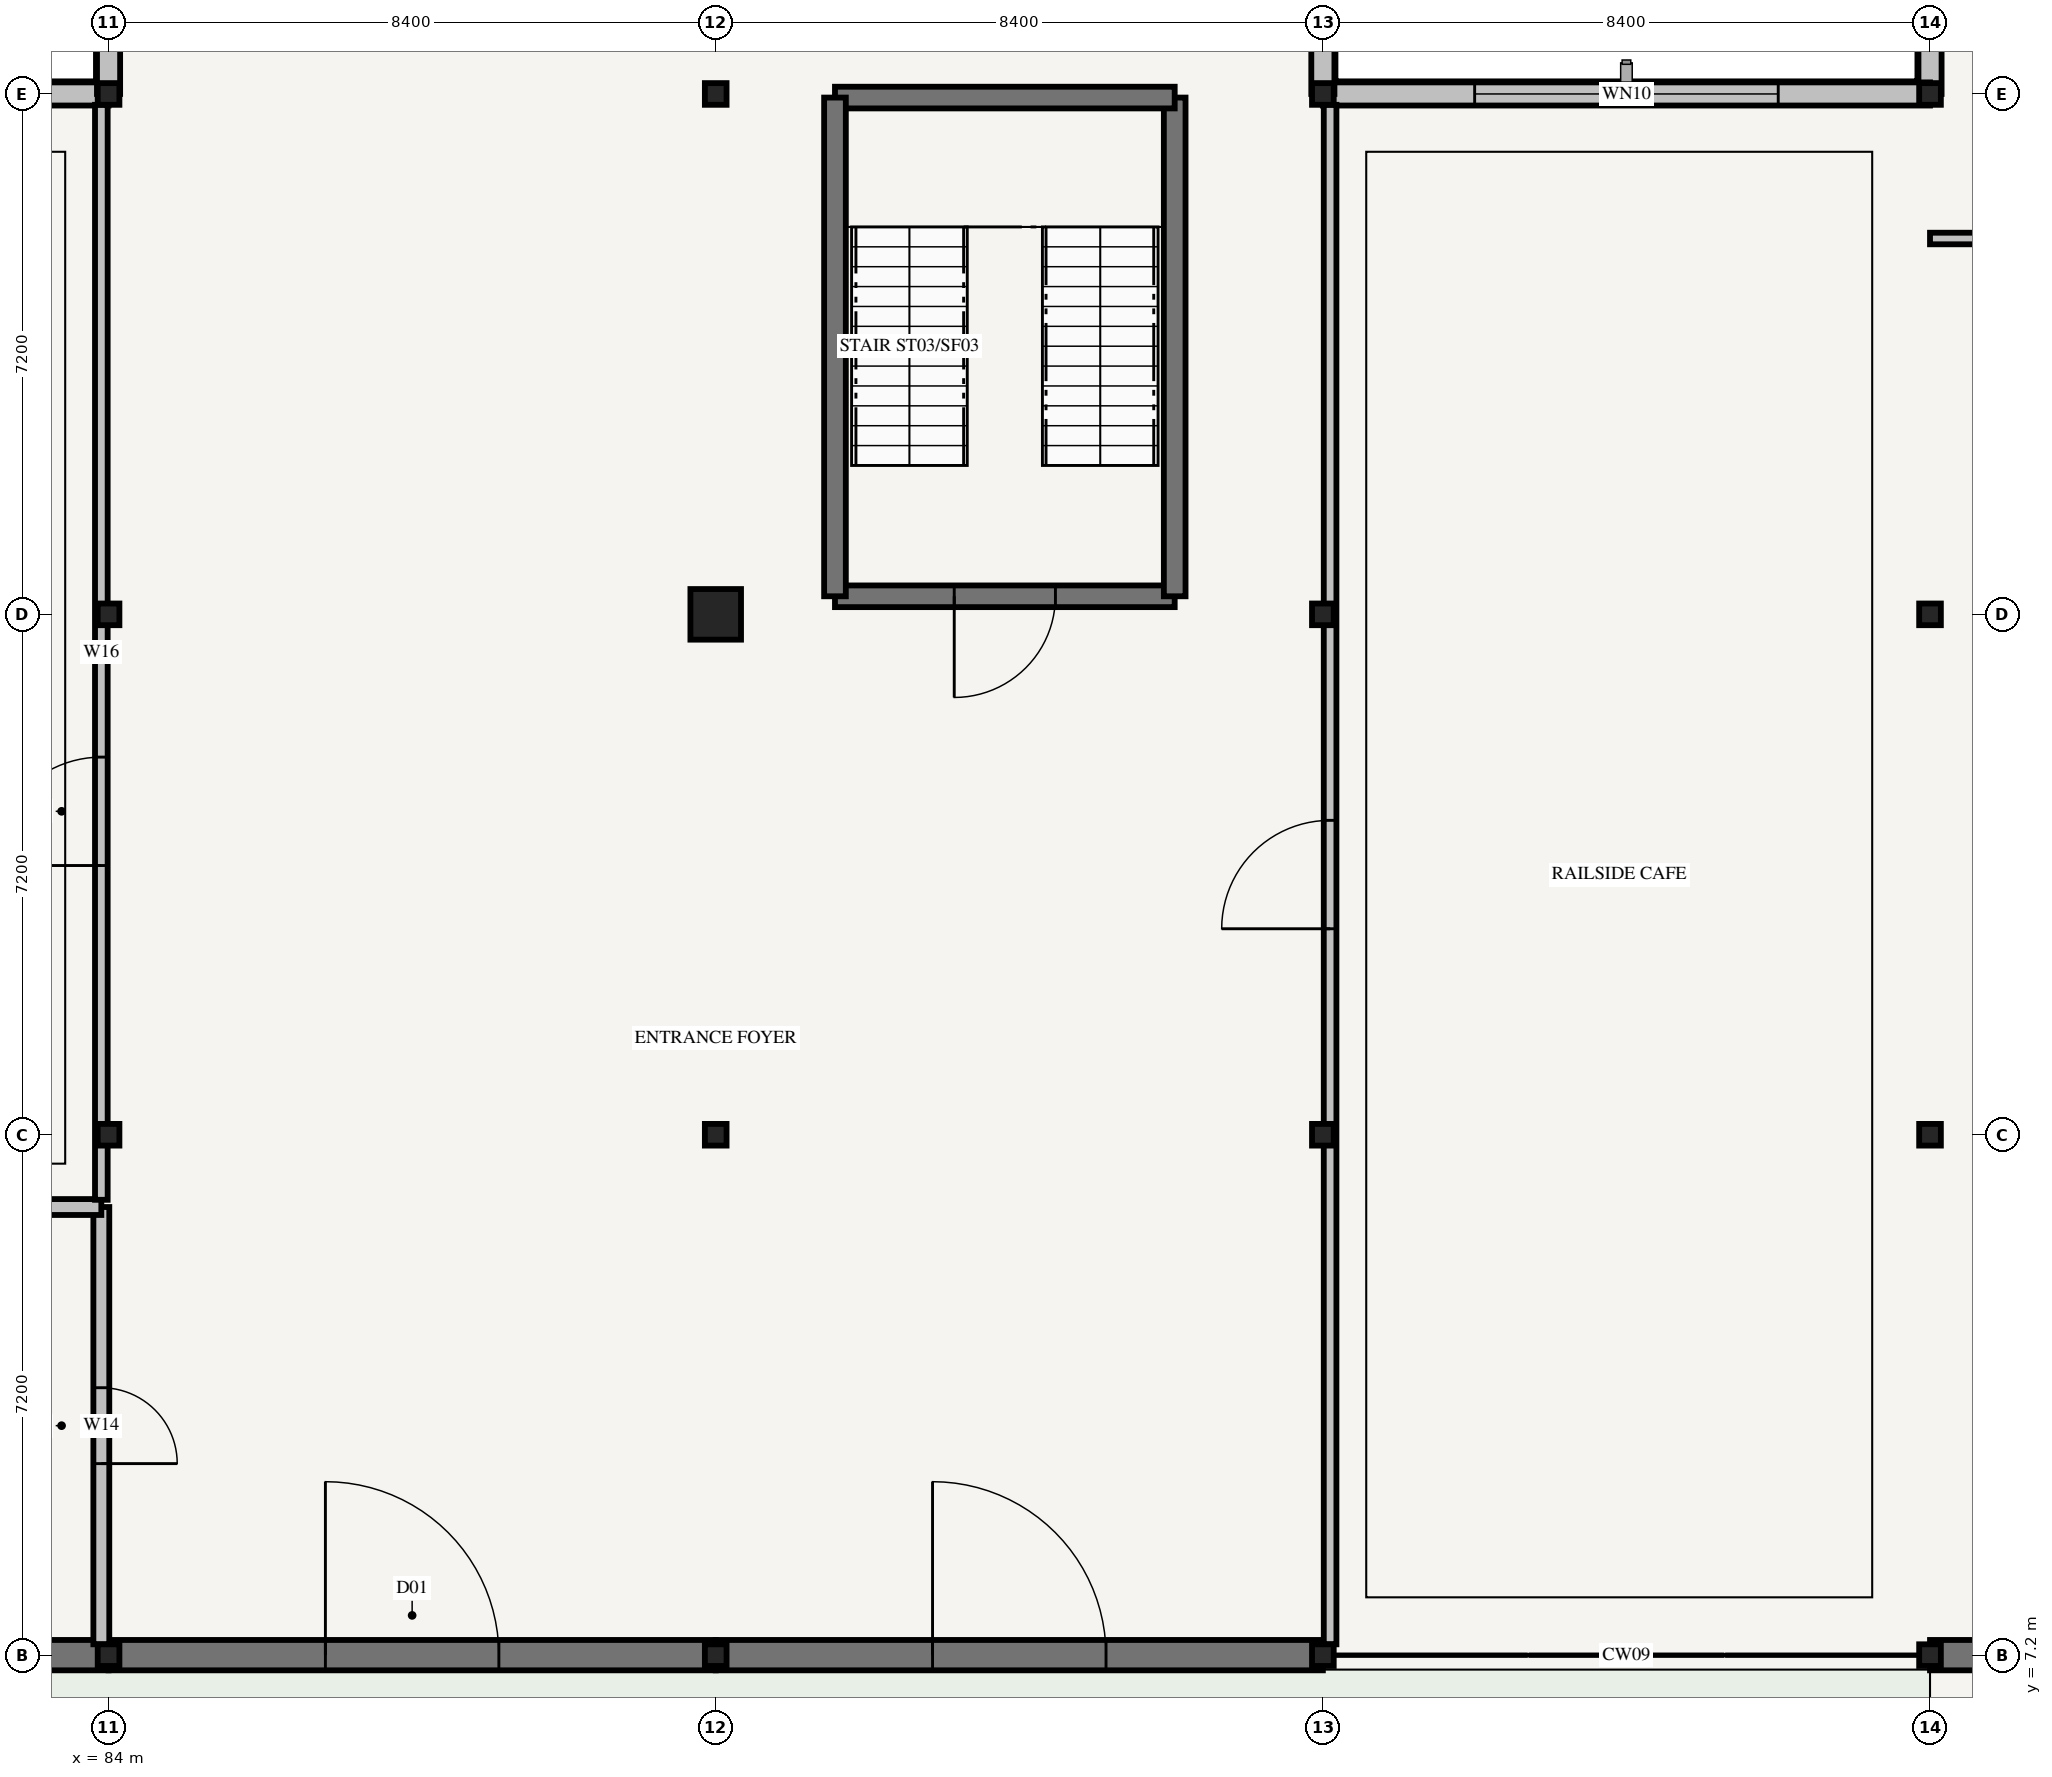
"""IFC4 building model, lengths in metres.
Left out: names, types, materials, properties, quantities, classifications, styles, units other than length and angle.
Written with IfcOpenShell. Run it as: python <this file> out.ifc"""

import sys

from ifc_helpers import new_model, si_unit, direction, frame, frame_2d, origin, origin_2d, place, context, subcontext, project, spatial, rectangle, i_section, extrude, element, fill, save


model = new_model("IFC4")
c1 = context("Model", 3, precision=1e-05, world=origin(), true_north=direction((0.0, 1.0)))
c2 = subcontext(c1, "Body", "Model", "MODEL_VIEW")
j1 = project(units=[si_unit("LENGTHUNIT", "METRE"), si_unit("PLANEANGLEUNIT", "RADIAN")], contexts=[c1])
p1 = place(None, origin())
s1 = spatial("IfcSite", under=j1, at=p1, CompositionType="ELEMENT")
p2 = place(p1, origin())
s2 = spatial("IfcBuilding", under=s1, at=p2, CompositionType="ELEMENT")
p3 = place(p2, origin())
s3 = spatial("IfcBuildingStorey", under=s2, at=p3, CompositionType="ELEMENT", Elevation=0.0)
for number, where, z_axis, x_axis in (
    (1, (84.0, 7.2, -0.42), (0.0, 0.0, 1.0), (1.0, 0.0, 0.0)),
    (2, (84.0, 14.4, -0.42), (0.0, 0.0, 1.0), (1.0, 0.0, 0.0)),
    (3, (84.0, 21.6, -0.42), (0.0, 0.0, 1.0), (1.0, 0.0, 0.0)),
    (4, (84.0, 28.8, -0.42), (0.0, 0.0, 1.0), (1.0, 0.0, 0.0)),
    (5, (92.4, 7.2, -0.42), (0.0, 0.0, 1.0), (1.0, 0.0, 0.0)),
    (6, (92.4, 14.4, -0.42), (0.0, 0.0, 1.0), (1.0, 0.0, 0.0)),
):
    element("IfcColumn", number, at=place(p3, frame(where, z_axis=z_axis, x_axis=x_axis)), inside=s3, PredefinedType="COLUMN", context=c2, shape_type="SweptSolid", body=[
        extrude(i_section(OverallWidth=0.3, OverallDepth=0.3, WebThickness=0.011, FlangeThickness=0.019, FilletRadius=0.027, at=origin_2d()), origin(), (0.0, 0.0, 1.0), 4.92),
    ])
p4 = place(p3, frame((92.4, 21.6, -0.42), z_axis=(0.0, 0.0, 1.0), x_axis=(1.0, 0.0, 0.0)))
e7 = element("IfcColumn", 7, at=p4, inside=s3, PredefinedType="COLUMN", context=c2, shape_type="SweptSolid", body=[
    extrude(rectangle(XDim=0.7, YDim=0.7, at=origin_2d()), origin(), (0.0, 0.0, 1.0), 4.92),
])
for number, where, z_axis, x_axis in (
    (8, (92.4, 28.8, -0.42), (0.0, 0.0, 1.0), (1.0, 0.0, 0.0)),
    (9, (100.8, 7.2, -0.42), (0.0, 0.0, 1.0), (1.0, 0.0, 0.0)),
    (10, (100.8, 14.4, -0.42), (0.0, 0.0, 1.0), (1.0, 0.0, 0.0)),
    (11, (100.8, 21.6, -0.42), (0.0, 0.0, 1.0), (1.0, 0.0, 0.0)),
    (12, (100.8, 28.8, -0.42), (0.0, 0.0, 1.0), (1.0, 0.0, 0.0)),
    (13, (109.2, 7.2, -0.42), (0.0, 0.0, 1.0), (1.0, 0.0, 0.0)),
    (14, (109.2, 14.4, -0.42), (0.0, 0.0, 1.0), (1.0, 0.0, 0.0)),
    (15, (109.2, 21.6, -0.42), (0.0, 0.0, 1.0), (1.0, 0.0, 0.0)),
    (16, (109.2, 28.8, -0.42), (0.0, 0.0, 1.0), (1.0, 0.0, 0.0)),
):
    element("IfcColumn", number, at=place(p3, frame(where, z_axis=z_axis, x_axis=x_axis)), inside=s3, PredefinedType="COLUMN", context=c2, shape_type="SweptSolid", body=[
        extrude(i_section(OverallWidth=0.3, OverallDepth=0.3, WebThickness=0.011, FlangeThickness=0.019, FilletRadius=0.027, at=origin_2d()), origin(), (0.0, 0.0, 1.0), 4.92),
    ])
p5 = place(p3, frame((84.0, 28.8, 0.0), z_axis=(0.0, 0.0, 1.0), x_axis=(-1.0, 0.0, 0.0)))
e17 = element("IfcWall", 17, at=p5, inside=s3, PredefinedType="STANDARD", context=c2, shape_type="SweptSolid", body=[
    extrude(rectangle(XDim=4.047, YDim=0.32, at=frame_2d((2.023, 0.0))), origin(), (0.0, 0.0, 1.0), 3.705),
])
p6 = place(p3, frame((75.6, 7.2, 0.0), z_axis=(0.0, 0.0, 1.0), x_axis=(1.0, 0.0, 0.0)))
e18 = element("IfcWall", 18, at=p6, inside=s3, PredefinedType="SOLIDWALL", context=c2, shape_type="SweptSolid", body=[
    extrude(rectangle(XDim=8.4, YDim=0.42, at=frame_2d((4.2, 0.0))), origin(), (0.0, 0.0, 1.0), 3.805),
])
p7 = place(p6, frame((3.6, 0.0, 0.0)))
e19 = element("IfcOpeningElement", 19, at=p7, cuts=e18, PredefinedType="OPENING", context=c2, shape_type="SweptSolid", body=[
    extrude(rectangle(XDim=1.2, YDim=2.25, at=frame_2d((0.6, 1.125))), frame((0.0, 0.235, 0.0), z_axis=(0.0, -1.0, 0.0), x_axis=(1.0, 0.0, 0.0)), (0.0, 0.0, 1.0), 0.47),
])
p8 = place(p3, frame((84.0, 7.2, 0.0), z_axis=(0.0, 0.0, 1.0), x_axis=(1.0, 0.0, 0.0)))
e20 = element("IfcWall", 20, at=p8, inside=s3, PredefinedType="SOLIDWALL", context=c2, shape_type="SweptSolid", body=[
    extrude(rectangle(XDim=8.4, YDim=0.42, at=frame_2d((4.2, 0.0))), origin(), (0.0, 0.0, 1.0), 3.855),
])
p9 = place(p8, frame((3.0, 0.0, 0.0)))
e21 = element("IfcOpeningElement", 21, at=p9, cuts=e20, PredefinedType="OPENING", context=c2, shape_type="SweptSolid", body=[
    extrude(rectangle(XDim=2.4, YDim=2.7, at=frame_2d((1.2, 1.35))), frame((0.0, 0.235, 0.0), z_axis=(0.0, -1.0, 0.0), x_axis=(1.0, 0.0, 0.0)), (0.0, 0.0, 1.0), 0.47),
])
p10 = place(p3, frame((92.4, 7.2, 0.0), z_axis=(0.0, 0.0, 1.0), x_axis=(1.0, 0.0, 0.0)))
e22 = element("IfcWall", 22, at=p10, inside=s3, PredefinedType="SOLIDWALL", context=c2, shape_type="SweptSolid", body=[
    extrude(rectangle(XDim=8.4, YDim=0.42, at=frame_2d((4.2, 0.0))), origin(), (0.0, 0.0, 1.0), 3.805),
])
p11 = place(p10, frame((3.0, 0.0, 0.0)))
e23 = element("IfcOpeningElement", 23, at=p11, cuts=e22, PredefinedType="OPENING", context=c2, shape_type="SweptSolid", body=[
    extrude(rectangle(XDim=2.4, YDim=2.7, at=frame_2d((1.2, 1.35))), frame((0.0, 0.235, 0.0), z_axis=(0.0, -1.0, 0.0), x_axis=(1.0, 0.0, 0.0)), (0.0, 0.0, 1.0), 0.47),
])
p12 = place(p3, frame((109.2, 7.2, 0.0), z_axis=(0.0, 0.0, 1.0), x_axis=(1.0, 0.0, 0.0)))
e24 = element("IfcWall", 24, at=p12, inside=s3, PredefinedType="SOLIDWALL", context=c2, shape_type="SweptSolid", body=[
    extrude(rectangle(XDim=8.4, YDim=0.42, at=frame_2d((4.2, 0.0))), origin(), (0.0, 0.0, 1.0), 3.855),
])
p13 = place(p3, frame((109.2, 36.0, 0.0), z_axis=(0.0, 0.0, 1.0), x_axis=(0.0, -1.0, 0.0)))
e25 = element("IfcWall", 25, at=p13, inside=s3, PredefinedType="STANDARD", context=c2, shape_type="SweptSolid", body=[
    extrude(rectangle(XDim=7.2, YDim=0.32, at=frame_2d((3.6, 0.0))), origin(), (0.0, 0.0, 1.0), 3.705),
])
p14 = place(p13, frame((2.0, 0.0, 2.1)))
e26 = element("IfcOpeningElement", 26, at=p14, cuts=e25, PredefinedType="OPENING", context=c2, shape_type="SweptSolid", body=[
    extrude(rectangle(XDim=3.2, YDim=1.2, at=frame_2d((1.6, 0.6))), frame((0.0, 0.185, 0.0), z_axis=(0.0, -1.0, 0.0), x_axis=(1.0, 0.0, 0.0)), (0.0, 0.0, 1.0), 0.37),
])
p15 = place(p3, frame((109.2, 28.8, 0.0), z_axis=(0.0, 0.0, 1.0), x_axis=(-1.0, 0.0, 0.0)))
e27 = element("IfcWall", 27, at=p15, inside=s3, PredefinedType="STANDARD", context=c2, shape_type="SweptSolid", body=[
    extrude(rectangle(XDim=8.4, YDim=0.32, at=frame_2d((4.2, 0.0))), origin(), (0.0, 0.0, 1.0), 3.705),
])
p16 = place(p15, frame((2.1, 0.0, 0.85)))
e28 = element("IfcOpeningElement", 28, at=p16, cuts=e27, PredefinedType="OPENING", context=c2, shape_type="SweptSolid", body=[
    extrude(rectangle(XDim=4.2, YDim=2.1, at=frame_2d((2.1, 1.05))), frame((0.0, 0.185, 0.0), z_axis=(0.0, -1.0, 0.0), x_axis=(1.0, 0.0, 0.0)), (0.0, 0.0, 1.0), 0.37),
])
p17 = place(p3, frame((100.8, 28.8, 0.0), z_axis=(0.0, 0.0, 1.0), x_axis=(0.0, 1.0, 0.0)))
e29 = element("IfcWall", 29, at=p17, inside=s3, PredefinedType="STANDARD", context=c2, shape_type="SweptSolid", body=[
    extrude(rectangle(XDim=7.2, YDim=0.32, at=frame_2d((3.6, 0.0))), origin(), (0.0, 0.0, 1.0), 3.705),
])
p18 = place(p17, frame((2.65, 0.0, 0.85)))
e30 = element("IfcOpeningElement", 30, at=p18, cuts=e29, PredefinedType="OPENING", context=c2, shape_type="SweptSolid", body=[
    extrude(rectangle(XDim=1.9, YDim=1.35, at=frame_2d((0.95, 0.675))), frame((0.0, 0.185, 0.0), z_axis=(0.0, -1.0, 0.0), x_axis=(1.0, 0.0, 0.0)), (0.0, 0.0, 1.0), 0.37),
])
p19 = place(p3, frame((84.0, 31.525, 0.0), z_axis=(0.0, 0.0, 1.0), x_axis=(0.0, -1.0, 0.0)))
e31 = element("IfcWall", 31, at=p19, inside=s3, PredefinedType="STANDARD", context=c2, shape_type="SweptSolid", body=[
    extrude(rectangle(XDim=2.725, YDim=0.32, at=frame_2d((1.362, 0.0))), origin(), (0.0, 0.0, 1.0), 3.705),
])
p20 = place(p3, frame((94.05, 21.85, 0.0), z_axis=(0.0, 0.0, 1.0), x_axis=(1.0, 0.0, 0.0)))
e32 = element("IfcWall", 32, at=p20, inside=s3, PredefinedType="SHEAR", context=c2, shape_type="SweptSolid", body=[
    extrude(rectangle(XDim=4.7, YDim=0.3, at=frame_2d((2.35, 0.0))), origin(), (0.0, 0.0, 1.0), 4.32),
])
p21 = place(p20, frame((1.65, 0.0, 0.0)))
e33 = element("IfcOpeningElement", 33, at=p21, cuts=e32, PredefinedType="OPENING", context=c2, shape_type="SweptSolid", body=[
    extrude(rectangle(XDim=1.4, YDim=2.2, at=frame_2d((0.7, 1.1))), frame((0.0, 0.175, 0.0), z_axis=(0.0, -1.0, 0.0), x_axis=(1.0, 0.0, 0.0)), (0.0, 0.0, 1.0), 0.35),
])
p22 = place(p3, frame((98.75, 21.85, 0.0), z_axis=(0.0, 0.0, 1.0), x_axis=(0.0, 1.0, 0.0)))
e34 = element("IfcWall", 34, at=p22, inside=s3, PredefinedType="SHEAR", context=c2, shape_type="SweptSolid", body=[
    extrude(rectangle(XDim=6.9, YDim=0.3, at=frame_2d((3.45, 0.0))), origin(), (0.0, 0.0, 1.0), 4.32),
])
p23 = place(p3, frame((98.75, 28.75, 0.0), z_axis=(0.0, 0.0, 1.0), x_axis=(-1.0, 0.0, 0.0)))
e35 = element("IfcWall", 35, at=p23, inside=s3, PredefinedType="SHEAR", context=c2, shape_type="SweptSolid", body=[
    extrude(rectangle(XDim=4.7, YDim=0.3, at=frame_2d((2.35, 0.0))), origin(), (0.0, 0.0, 1.0), 4.32),
])
p24 = place(p3, frame((94.05, 28.75, 0.0), z_axis=(0.0, 0.0, 1.0), x_axis=(0.0, -1.0, 0.0)))
e36 = element("IfcWall", 36, at=p24, inside=s3, PredefinedType="SHEAR", context=c2, shape_type="SweptSolid", body=[
    extrude(rectangle(XDim=6.9, YDim=0.3, at=frame_2d((3.45, 0.0))), origin(), (0.0, 0.0, 1.0), 4.32),
])
p25 = place(p3, frame((83.9, 7.35, 0.0), z_axis=(0.0, 0.0, 1.0), x_axis=(0.0, 1.0, 0.0)))
e37 = element("IfcWall", 37, at=p25, inside=s3, PredefinedType="PARTITIONING", context=c2, shape_type="SweptSolid", body=[
    extrude(rectangle(XDim=6.05, YDim=0.22, at=frame_2d((3.025, 0.0))), origin(), (0.0, 0.0, 1.0), 3.62),
])
p26 = place(p25, frame((2.5, 0.0, 0.0)))
e38 = element("IfcOpeningElement", 38, at=p26, cuts=e37, PredefinedType="OPENING", context=c2, shape_type="SweptSolid", body=[
    extrude(rectangle(XDim=1.05, YDim=2.15, at=frame_2d((0.525, 1.075))), frame((0.0, 0.135, 0.0), z_axis=(0.0, -1.0, 0.0), x_axis=(1.0, 0.0, 0.0)), (0.0, 0.0, 1.0), 0.27),
])
p27 = place(p3, frame((75.75, 13.4, 0.0), z_axis=(0.0, 0.0, 1.0), x_axis=(1.0, 0.0, 0.0)))
e39 = element("IfcWall", 39, at=p27, inside=s3, PredefinedType="PARTITIONING", context=c2, shape_type="SweptSolid", body=[
    extrude(rectangle(XDim=8.15, YDim=0.22, at=frame_2d((4.075, 0.0))), origin(), (0.0, 0.0, 1.0), 3.62),
])
p28 = place(p3, frame((83.9, 13.5, 0.0), z_axis=(0.0, 0.0, 1.0), x_axis=(0.0, 1.0, 0.0)))
e40 = element("IfcWall", 40, at=p28, inside=s3, PredefinedType="PARTITIONING", context=c2, shape_type="SweptSolid", body=[
    extrude(rectangle(XDim=15.15, YDim=0.175, at=frame_2d((7.575, 0.0))), origin(), (0.0, 0.0, 1.0), 3.62),
])
p29 = place(p28, frame((4.625, 0.0, 0.0)))
e41 = element("IfcOpeningElement", 41, at=p29, cuts=e40, PredefinedType="OPENING", context=c2, shape_type="SweptSolid", body=[
    extrude(rectangle(XDim=1.5, YDim=2.2, at=frame_2d((0.75, 1.1))), frame((0.0, 0.112, 0.0), z_axis=(0.0, -1.0, 0.0), x_axis=(1.0, 0.0, 0.0)), (0.0, 0.0, 1.0), 0.225),
])
p30 = place(p3, frame((100.9, 7.35, 0.0), z_axis=(0.0, 0.0, 1.0), x_axis=(0.0, 1.0, 0.0)))
e42 = element("IfcWall", 42, at=p30, inside=s3, PredefinedType="PARTITIONING", context=c2, shape_type="SweptSolid", body=[
    extrude(rectangle(XDim=21.3, YDim=0.175, at=frame_2d((10.65, 0.0))), origin(), (0.0, 0.0, 1.0), 3.62),
])
p31 = place(p30, frame((9.9, 0.0, 0.0)))
e43 = element("IfcOpeningElement", 43, at=p31, cuts=e42, PredefinedType="OPENING", context=c2, shape_type="SweptSolid", body=[
    extrude(rectangle(XDim=1.5, YDim=2.2, at=frame_2d((0.75, 1.1))), frame((0.0, 0.112, 0.0), z_axis=(0.0, -1.0, 0.0), x_axis=(1.0, 0.0, 0.0)), (0.0, 0.0, 1.0), 0.225),
])
p32 = place(p3, frame((109.2, 26.8, 0.0), z_axis=(0.0, 0.0, 1.0), x_axis=(1.0, 0.0, 0.0)))
e44 = element("IfcWall", 44, at=p32, inside=s3, PredefinedType="PARTITIONING", context=c2, shape_type="SweptSolid", body=[
    extrude(rectangle(XDim=16.8, YDim=0.16, at=frame_2d((8.4, 0.0))), origin(), (0.0, 0.0, 1.0), 3.62),
])
p33 = place(p32, frame((7.825, 0.0, 0.0)))
e45 = element("IfcOpeningElement", 45, at=p33, cuts=e44, PredefinedType="OPENING", context=c2, shape_type="SweptSolid", body=[
    extrude(rectangle(XDim=1.15, YDim=2.15, at=frame_2d((0.575, 1.075))), frame((0.0, 0.105, 0.0), z_axis=(0.0, -1.0, 0.0), x_axis=(1.0, 0.0, 0.0)), (0.0, 0.0, 1.0), 0.21),
])
p34 = place(p9, frame((2.4, 0.0, 0.0), z_axis=(0.0, 0.0, 1.0), x_axis=(-1.0, 0.0, 0.0)))
e46 = element("IfcDoor", 46, at=p34, inside=s3, OperationType="DOUBLE_DOOR_SINGLE_SWING", PredefinedType="DOOR", context=c2, shape_type="SweptSolid", body=[
    extrude(rectangle(XDim=2.4, YDim=2.7, at=frame_2d((1.2, 1.35))), frame((0.0, 0.025, 0.0), z_axis=(0.0, -1.0, 0.0), x_axis=(1.0, 0.0, 0.0)), (0.0, 0.0, 1.0), 0.05),
])
fill(e21, e46)
p35 = place(p11, frame((2.4, 0.0, 0.0), z_axis=(0.0, 0.0, 1.0), x_axis=(-1.0, 0.0, 0.0)))
e47 = element("IfcDoor", 47, at=p35, inside=s3, OperationType="DOUBLE_DOOR_SINGLE_SWING", PredefinedType="DOOR", context=c2, shape_type="SweptSolid", body=[
    extrude(rectangle(XDim=2.4, YDim=2.7, at=frame_2d((1.2, 1.35))), frame((0.0, 0.025, 0.0), z_axis=(0.0, -1.0, 0.0), x_axis=(1.0, 0.0, 0.0)), (0.0, 0.0, 1.0), 0.05),
])
fill(e23, e47)
p36 = place(p16, origin())
e48 = element("IfcWindow", 48, at=p36, inside=s3, PartitioningType="SINGLE_PANEL", PredefinedType="WINDOW", context=c2, shape_type="SweptSolid", body=[
    extrude(rectangle(XDim=4.2, YDim=2.1, at=frame_2d((2.1, 1.05))), frame((0.0, 0.03, 0.0), z_axis=(0.0, -1.0, 0.0), x_axis=(1.0, 0.0, 0.0)), (0.0, 0.0, 1.0), 0.06),
])
fill(e28, e48)
p37 = place(p21, frame((1.4, 0.0, 0.0), z_axis=(0.0, 0.0, 1.0), x_axis=(-1.0, 0.0, 0.0)))
e49 = element("IfcDoor", 49, at=p37, inside=s3, OperationType="SINGLE_SWING_RIGHT", PredefinedType="DOOR", context=c2, shape_type="SweptSolid", body=[
    extrude(rectangle(XDim=1.4, YDim=2.2, at=frame_2d((0.7, 1.1))), frame((0.0, 0.025, 0.0), z_axis=(0.0, -1.0, 0.0), x_axis=(1.0, 0.0, 0.0)), (0.0, 0.0, 1.0), 0.05),
])
fill(e33, e49)
p38 = place(p26, origin())
e50 = element("IfcDoor", 50, at=p38, inside=s3, OperationType="SINGLE_SWING_RIGHT", PredefinedType="DOOR", context=c2, shape_type="SweptSolid", body=[
    extrude(rectangle(XDim=1.05, YDim=2.15, at=frame_2d((0.525, 1.075))), frame((0.0, 0.025, 0.0), z_axis=(0.0, -1.0, 0.0), x_axis=(1.0, 0.0, 0.0)), (0.0, 0.0, 1.0), 0.05),
])
fill(e38, e50)
p39 = place(p29, origin())
e51 = element("IfcDoor", 51, at=p39, inside=s3, OperationType="DOUBLE_DOOR_SINGLE_SWING", PredefinedType="DOOR", context=c2, shape_type="SweptSolid", body=[
    extrude(rectangle(XDim=1.5, YDim=2.2, at=frame_2d((0.75, 1.1))), frame((0.0, 0.025, 0.0), z_axis=(0.0, -1.0, 0.0), x_axis=(1.0, 0.0, 0.0)), (0.0, 0.0, 1.0), 0.05),
])
fill(e41, e51)
p40 = place(p31, frame((1.5, 0.0, 0.0), z_axis=(0.0, 0.0, 1.0), x_axis=(-1.0, 0.0, 0.0)))
e52 = element("IfcDoor", 52, at=p40, inside=s3, OperationType="DOUBLE_DOOR_SINGLE_SWING", PredefinedType="DOOR", context=c2, shape_type="SweptSolid", body=[
    extrude(rectangle(XDim=1.5, YDim=2.2, at=frame_2d((0.75, 1.1))), frame((0.0, 0.025, 0.0), z_axis=(0.0, -1.0, 0.0), x_axis=(1.0, 0.0, 0.0)), (0.0, 0.0, 1.0), 0.05),
])
fill(e43, e52)
save(model, sys.argv[1])
